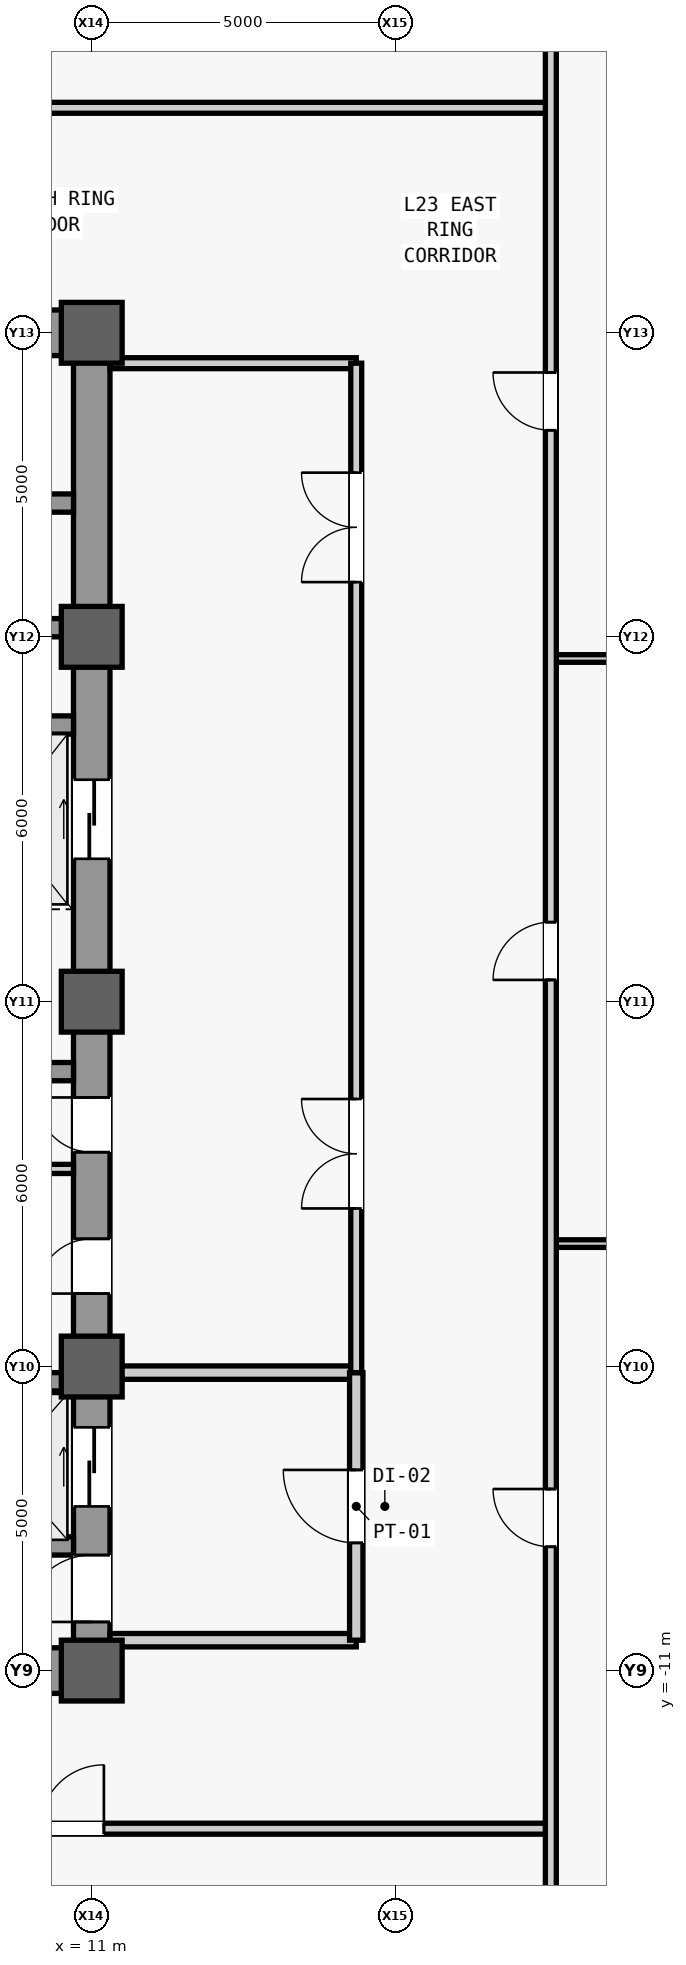
"""IFC4 building model, lengths in metres.
Left out: names, types, materials, properties, quantities, classifications, styles, units other than length and angle.
Written with IfcOpenShell. Run it as: python <this file> out.ifc"""

import sys

from ifc_helpers import new_model, si_unit, direction, frame, frame_2d, origin, origin_2d, place, context, subcontext, project, spatial, rectangle, extrude, source, transform, mapped, element, fill, save


model = new_model("IFC4")
c1 = context("Model", 3, precision=1e-05, world=origin(), true_north=direction((0.0, 1.0)))
c2 = subcontext(c1, "Body", "Model", "MODEL_VIEW")
j1 = project(units=[si_unit("LENGTHUNIT", "METRE"), si_unit("PLANEANGLEUNIT", "RADIAN")], contexts=[c1])
p1 = place(None, origin())
s1 = spatial("IfcSite", under=j1, at=p1, CompositionType="ELEMENT")
p2 = place(p1, origin())
s2 = spatial("IfcBuilding", under=s1, at=p2, CompositionType="ELEMENT")
p3 = place(p2, frame((0.0, 0.0, 103.7)))
s3 = spatial("IfcBuildingStorey", under=s2, at=p3, CompositionType="ELEMENT", Elevation=103.7)
m1 = source(origin(), c2, "Body", "SweptSolid", [
    extrude(rectangle(XDim=22.0, YDim=0.6, at=frame_2d((11.0, 0.0))), origin(), (0.0, 0.0, 1.0), 3.84),
])
p4 = place(p3, frame((11.0, -11.0, 0.0), z_axis=(0.0, 0.0, 1.0), x_axis=(0.0, 1.0, 0.0)))
e1 = element("IfcWall", 1, at=p4, inside=s3, PredefinedType="SHEAR", context=c2, shape_type="MappedRepresentation", body=[
    mapped(m1, transform((0.0, 0.0, 0.0), scale=1.0)),
])
m2 = source(origin(), c2, "Body", "SweptSolid", [
    extrude(rectangle(XDim=1.1, YDim=2.2, at=frame_2d((0.55, 1.1))), frame((0.0, 0.31, 0.0), z_axis=(0.0, -1.0, 0.0), x_axis=(1.0, 0.0, 0.0)), (0.0, 0.0, 1.0), 0.62),
])
p5 = place(p4, frame((0.8, 0.0, 0.0)))
e2 = element("IfcOpeningElement", 2, at=p5, cuts=e1, PredefinedType="OPENING", context=c2, shape_type="MappedRepresentation", body=[
    mapped(m2, transform((0.0, 0.0, 0.0), scale=1.0)),
])
m3 = source(origin(), c2, "Body", "SweptSolid", [
    extrude(rectangle(XDim=0.9, YDim=2.15, at=frame_2d((0.45, 1.075))), frame((0.0, 0.31, 0.0), z_axis=(0.0, -1.0, 0.0), x_axis=(1.0, 0.0, 0.0)), (0.0, 0.0, 1.0), 0.62),
])
p6 = place(p4, frame((6.2, 0.0, 0.0)))
e3 = element("IfcOpeningElement", 3, at=p6, cuts=e1, PredefinedType="OPENING", context=c2, shape_type="MappedRepresentation", body=[
    mapped(m3, transform((0.0, 0.0, 0.0), scale=1.0)),
])
p7 = place(p4, frame((8.525, 0.0, 0.0)))
e4 = element("IfcOpeningElement", 4, at=p7, cuts=e1, PredefinedType="OPENING", context=c2, shape_type="MappedRepresentation", body=[
    mapped(m3, transform((0.0, 0.0, 0.0), scale=1.0)),
])
m4 = source(origin(), c2, "Body", "SweptSolid", [
    extrude(rectangle(XDim=1.3, YDim=2.3, at=frame_2d((0.65, 1.15))), frame((0.0, 0.31, 0.0), z_axis=(0.0, -1.0, 0.0), x_axis=(1.0, 0.0, 0.0)), (0.0, 0.0, 1.0), 0.62),
])
p8 = place(p4, frame((2.7, 0.0, 0.0)))
e5 = element("IfcOpeningElement", 5, at=p8, cuts=e1, PredefinedType="OPENING", context=c2, shape_type="MappedRepresentation", body=[
    mapped(m4, transform((0.0, 0.0, 0.0), scale=1.0)),
])
p9 = place(p4, frame((13.35, 0.0, 0.0)))
e6 = element("IfcOpeningElement", 6, at=p9, cuts=e1, PredefinedType="OPENING", context=c2, shape_type="MappedRepresentation", body=[
    mapped(m4, transform((0.0, 0.0, 0.0), scale=1.0)),
])
m5 = source(origin(), c2, "Body", "SweptSolid", [
    extrude(rectangle(XDim=5.85, YDim=0.75, at=frame_2d((2.925, 0.0))), origin(), (0.0, 0.0, 1.0), 3.84),
])
p10 = place(p3, frame((4.85, -11.0, 0.0), z_axis=(0.0, 0.0, 1.0), x_axis=(1.0, 0.0, 0.0)))
e7 = element("IfcWall", 7, at=p10, inside=s3, PredefinedType="SHEAR", context=c2, shape_type="MappedRepresentation", body=[
    mapped(m5, transform((0.0, 0.0, 0.0), scale=1.0)),
])
p11 = place(p3, frame((4.85, 11.0, 0.0), z_axis=(0.0, 0.0, 1.0), x_axis=(1.0, 0.0, 0.0)))
e8 = element("IfcWall", 8, at=p11, inside=s3, PredefinedType="SHEAR", context=c2, shape_type="MappedRepresentation", body=[
    mapped(m5, transform((0.0, 0.0, 0.0), scale=1.0)),
])
m6 = source(origin(), c2, "Body", "SweptSolid", [
    extrude(rectangle(XDim=1.05, YDim=2.2, at=frame_2d((0.525, 1.1))), frame((0.0, 0.385, 0.0), z_axis=(0.0, -1.0, 0.0), x_axis=(1.0, 0.0, 0.0)), (0.0, 0.0, 1.0), 0.77),
])
p12 = place(p11, frame((1.375, 0.0, 0.0)))
e9 = element("IfcOpeningElement", 9, at=p12, cuts=e8, PredefinedType="OPENING", context=c2, shape_type="MappedRepresentation", body=[
    mapped(m6, transform((0.0, 0.0, 0.0), scale=1.0)),
])
m7 = source(origin(), c2, "Body", "SweptSolid", [
    extrude(rectangle(XDim=5.6, YDim=0.3, at=frame_2d((2.8, 0.0))), origin(), (0.0, 0.0, 1.0), 3.84),
])
p13 = place(p3, frame((5.1, -1.15, 0.0), z_axis=(0.0, 0.0, 1.0), x_axis=(1.0, 0.0, 0.0)))
e10 = element("IfcWall", 10, at=p13, inside=s3, PredefinedType="SHEAR", context=c2, shape_type="MappedRepresentation", body=[
    mapped(m7, transform((0.0, 0.0, 0.0), scale=1.0)),
])
m8 = source(origin(), c2, "Body", "SweptSolid", [
    extrude(rectangle(XDim=1.0, YDim=1.0, at=origin_2d()), origin(), (0.0, 0.0, 1.0), 4.1),
])
for number, where, z_axis, x_axis in (
    (11, (11.0, -11.0, 0.0), (0.0, 0.0, 1.0), (1.0, 0.0, 0.0)),
    (12, (11.0, -6.0, 0.0), (0.0, 0.0, 1.0), (1.0, 0.0, 0.0)),
    (13, (11.0, 0.0, 0.0), (0.0, 0.0, 1.0), (1.0, 0.0, 0.0)),
    (14, (11.0, 6.0, 0.0), (0.0, 0.0, 1.0), (1.0, 0.0, 0.0)),
    (15, (11.0, 11.0, 0.0), (0.0, 0.0, 1.0), (1.0, 0.0, 0.0)),
):
    element("IfcColumn", number, at=place(p3, frame(where, z_axis=z_axis, x_axis=x_axis)), inside=s3, PredefinedType="COLUMN", context=c2, shape_type="MappedRepresentation", body=[
        mapped(m8, transform((0.0, 0.0, 0.0), scale=1.0)),
    ])
m9 = source(origin(), c2, "Body", "SweptSolid", [
    extrude(rectangle(XDim=2.2, YDim=0.3, at=frame_2d((1.1, 0.0))), origin(), (0.0, 0.0, 1.0), 3.84),
])
for number, where, z_axis, x_axis in (
    (16, (8.5, -8.95, 0.0), (0.0, 0.0, 1.0), (1.0, 0.0, 0.0)),
    (17, (8.5, -6.25, 0.0), (0.0, 0.0, 1.0), (1.0, 0.0, 0.0)),
):
    element("IfcWall", number, at=place(p3, frame(where, z_axis=z_axis, x_axis=x_axis)), inside=s3, PredefinedType="SHEAR", context=c2, shape_type="MappedRepresentation", body=[
        mapped(m9, transform((0.0, 0.0, 0.0), scale=1.0)),
    ])
m10 = source(origin(), c2, "Body", "SweptSolid", [
    extrude(rectangle(XDim=2.3, YDim=0.3, at=frame_2d((1.15, 0.0))), origin(), (0.0, 0.0, 1.0), 3.84),
])
for number, where, z_axis, x_axis in (
    (18, (8.4, 4.55, 0.0), (0.0, 0.0, 1.0), (1.0, 0.0, 0.0)),
    (19, (8.4, 6.15, 0.0), (0.0, 0.0, 1.0), (1.0, 0.0, 0.0)),
    (20, (8.4, 8.2, 0.0), (0.0, 0.0, 1.0), (1.0, 0.0, 0.0)),
):
    element("IfcWall", number, at=place(p3, frame(where, z_axis=z_axis, x_axis=x_axis)), inside=s3, PredefinedType="SHEAR", context=c2, shape_type="MappedRepresentation", body=[
        mapped(m10, transform((0.0, 0.0, 0.0), scale=1.0)),
    ])
m11 = source(origin(), c2, "Body", "SweptSolid", [
    extrude(rectangle(XDim=2.05, YDim=0.15, at=frame_2d((1.025, 0.0))), origin(), (0.0, 0.0, 1.0), 3.84),
])
p14 = place(p3, frame((8.65, -2.75, 0.0), z_axis=(0.0, 0.0, 1.0), x_axis=(1.0, 0.0, 0.0)))
e21 = element("IfcWall", 21, at=p14, inside=s3, PredefinedType="PARTITIONING", context=c2, shape_type="MappedRepresentation", body=[
    mapped(m11, transform((0.0, 0.0, 0.0), scale=1.0)),
])
m12 = source(origin(), c2, "Body", "SweptSolid", [
    extrude(rectangle(XDim=4.05, YDim=0.22, at=frame_2d((2.025, 0.0))), origin(), (0.0, 0.0, 1.0), 3.84),
])
p15 = place(p3, frame((11.3, -10.5, 0.0), z_axis=(0.0, 0.0, 1.0), x_axis=(1.0, 0.0, 0.0)))
e22 = element("IfcWall", 22, at=p15, inside=s3, PredefinedType="PARTITIONING", context=c2, shape_type="MappedRepresentation", body=[
    mapped(m12, transform((0.0, 0.0, 0.0), scale=1.0)),
])
m13 = source(origin(), c2, "Body", "SweptSolid", [
    extrude(rectangle(XDim=4.05, YDim=0.22, at=frame_2d((2.025, 0.0))), origin(), (0.0, 0.0, 1.0), 3.067),
])
p16 = place(p3, frame((11.3, -6.1, 0.0), z_axis=(0.0, 0.0, 1.0), x_axis=(1.0, 0.0, 0.0)))
e23 = element("IfcWall", 23, at=p16, inside=s3, PredefinedType="PARTITIONING", context=c2, shape_type="MappedRepresentation", body=[
    mapped(m13, transform((0.0, 0.0, 0.0), scale=1.0)),
])
m14 = source(origin(), c2, "Body", "SweptSolid", [
    extrude(rectangle(XDim=4.4, YDim=0.22, at=frame_2d((2.2, 0.0))), origin(), (0.0, 0.0, 1.0), 3.84),
])
p17 = place(p3, frame((15.35, -10.5, 0.0), z_axis=(0.0, 0.0, 1.0), x_axis=(0.0, 1.0, 0.0)))
e24 = element("IfcWall", 24, at=p17, inside=s3, PredefinedType="PARTITIONING", context=c2, shape_type="MappedRepresentation", body=[
    mapped(m14, transform((0.0, 0.0, 0.0), scale=1.0)),
])
m15 = source(origin(), c2, "Body", "SweptSolid", [
    extrude(rectangle(XDim=1.2, YDim=2.2, at=frame_2d((0.6, 1.1))), frame((0.0, 0.12, 0.0), z_axis=(0.0, -1.0, 0.0), x_axis=(1.0, 0.0, 0.0)), (0.0, 0.0, 1.0), 0.24),
])
p18 = place(p17, frame((1.6, 0.0, 0.0)))
e25 = element("IfcOpeningElement", 25, at=p18, cuts=e24, PredefinedType="OPENING", context=c2, shape_type="MappedRepresentation", body=[
    mapped(m15, transform((0.0, 0.0, 0.0), scale=1.0)),
])
m16 = source(origin(), c2, "Body", "SweptSolid", [
    extrude(rectangle(XDim=4.05, YDim=0.18, at=frame_2d((2.025, 0.0))), origin(), (0.0, 0.0, 1.0), 3.84),
])
p19 = place(p3, frame((11.3, 10.5, 0.0), z_axis=(0.0, 0.0, 1.0), x_axis=(1.0, 0.0, 0.0)))
e26 = element("IfcWall", 26, at=p19, inside=s3, PredefinedType="PARTITIONING", context=c2, shape_type="MappedRepresentation", body=[
    mapped(m16, transform((0.0, 0.0, 0.0), scale=1.0)),
])
m17 = source(origin(), c2, "Body", "SweptSolid", [
    extrude(rectangle(XDim=16.6, YDim=0.18, at=frame_2d((8.3, 0.0))), origin(), (0.0, 0.0, 1.0), 3.84),
])
p20 = place(p3, frame((15.35, -6.1, 0.0), z_axis=(0.0, 0.0, 1.0), x_axis=(0.0, 1.0, 0.0)))
e27 = element("IfcWall", 27, at=p20, inside=s3, PredefinedType="PARTITIONING", context=c2, shape_type="MappedRepresentation", body=[
    mapped(m17, transform((0.0, 0.0, 0.0), scale=1.0)),
])
m18 = source(origin(), c2, "Body", "SweptSolid", [
    extrude(rectangle(XDim=1.8, YDim=2.25, at=frame_2d((0.9, 1.125))), frame((0.0, 0.1, 0.0), z_axis=(0.0, -1.0, 0.0), x_axis=(1.0, 0.0, 0.0)), (0.0, 0.0, 1.0), 0.2),
])
p21 = place(p20, frame((2.7, 0.0, 0.0)))
e28 = element("IfcOpeningElement", 28, at=p21, cuts=e27, PredefinedType="OPENING", context=c2, shape_type="MappedRepresentation", body=[
    mapped(m18, transform((0.0, 0.0, 0.0), scale=1.0)),
])
p22 = place(p20, frame((13.0, 0.0, 0.0)))
e29 = element("IfcOpeningElement", 29, at=p22, cuts=e27, PredefinedType="OPENING", context=c2, shape_type="MappedRepresentation", body=[
    mapped(m18, transform((0.0, 0.0, 0.0), scale=1.0)),
])
m19 = source(origin(), c2, "Body", "SweptSolid", [
    extrude(rectangle(XDim=36.25, YDim=0.18, at=frame_2d((18.125, 0.0))), origin(), (0.0, 0.0, 1.0), 3.84),
])
p23 = place(p3, frame((-17.7, -13.6, 0.0), z_axis=(0.0, 0.0, 1.0), x_axis=(1.0, 0.0, 0.0)))
e30 = element("IfcWall", 30, at=p23, inside=s3, PredefinedType="PARTITIONING", context=c2, shape_type="MappedRepresentation", body=[
    mapped(m19, transform((0.0, 0.0, 0.0), scale=1.0)),
])
m20 = source(origin(), c2, "Body", "SweptSolid", [
    extrude(rectangle(XDim=1.05, YDim=2.2, at=frame_2d((0.525, 1.1))), frame((0.0, 0.1, 0.0), z_axis=(0.0, -1.0, 0.0), x_axis=(1.0, 0.0, 0.0)), (0.0, 0.0, 1.0), 0.2),
])
p24 = place(p23, frame((6.925, 0.0, 0.0)))
e31 = element("IfcOpeningElement", 31, at=p24, cuts=e30, PredefinedType="OPENING", context=c2, shape_type="MappedRepresentation", body=[
    mapped(m20, transform((0.0, 0.0, 0.0), scale=1.0)),
])
p25 = place(p23, frame((17.6, 0.0, 0.0)))
e32 = element("IfcOpeningElement", 32, at=p25, cuts=e30, PredefinedType="OPENING", context=c2, shape_type="MappedRepresentation", body=[
    mapped(m20, transform((0.0, 0.0, 0.0), scale=1.0)),
])
p26 = place(p23, frame((27.85, 0.0, 0.0)))
e33 = element("IfcOpeningElement", 33, at=p26, cuts=e30, PredefinedType="OPENING", context=c2, shape_type="MappedRepresentation", body=[
    mapped(m20, transform((0.0, 0.0, 0.0), scale=1.0)),
])
p27 = place(p3, frame((-17.7, 14.7, 0.0), z_axis=(0.0, 0.0, 1.0), x_axis=(1.0, 0.0, 0.0)))
e34 = element("IfcWall", 34, at=p27, inside=s3, PredefinedType="PARTITIONING", context=c2, shape_type="MappedRepresentation", body=[
    mapped(m19, transform((0.0, 0.0, 0.0), scale=1.0)),
])
p28 = place(p27, frame((17.175, 0.0, 0.0)))
e35 = element("IfcOpeningElement", 35, at=p28, cuts=e34, PredefinedType="OPENING", context=c2, shape_type="MappedRepresentation", body=[
    mapped(m20, transform((0.0, 0.0, 0.0), scale=1.0)),
])
m21 = source(origin(), c2, "Body", "SweptSolid", [
    extrude(rectangle(XDim=13.45, YDim=0.125, at=frame_2d((6.725, 0.0))), origin(), (0.0, 0.0, 1.0), 3.84),
])
for number, where, z_axis, x_axis in (
    (36, (18.55, -3.978, 0.0), (0.0, 0.0, 1.0), (1.0, 0.0, 0.0)),
    (37, (18.55, 5.644, 0.0), (0.0, 0.0, 1.0), (1.0, 0.0, 0.0)),
):
    element("IfcWall", number, at=place(p3, frame(where, z_axis=z_axis, x_axis=x_axis)), inside=s3, PredefinedType="PARTITIONING", context=c2, shape_type="MappedRepresentation", body=[
        mapped(m21, transform((0.0, 0.0, 0.0), scale=1.0)),
    ])
m22 = source(origin(), c2, "Body", "SweptSolid", [
    extrude(rectangle(XDim=56.0, YDim=0.18, at=frame_2d((28.0, 0.0))), origin(), (0.0, 0.0, 1.0), 3.84),
])
p29 = place(p3, frame((18.55, -28.0, 0.0), z_axis=(0.0, 0.0, 1.0), x_axis=(0.0, 1.0, 0.0)))
e38 = element("IfcWall", 38, at=p29, inside=s3, PredefinedType="PARTITIONING", context=c2, shape_type="MappedRepresentation", body=[
    mapped(m22, transform((0.0, 0.0, 0.0), scale=1.0)),
])
m23 = source(origin(), c2, "Body", "SweptSolid", [
    extrude(rectangle(XDim=0.95, YDim=2.15, at=frame_2d((0.475, 1.075))), frame((0.0, 0.1, 0.0), z_axis=(0.0, -1.0, 0.0), x_axis=(1.0, 0.0, 0.0)), (0.0, 0.0, 1.0), 0.2),
])
p30 = place(p29, frame((19.036, 0.0, 0.0)))
e39 = element("IfcOpeningElement", 39, at=p30, cuts=e38, PredefinedType="OPENING", context=c2, shape_type="MappedRepresentation", body=[
    mapped(m23, transform((0.0, 0.0, 0.0), scale=1.0)),
])
p31 = place(p29, frame((28.358, 0.0, 0.0)))
e40 = element("IfcOpeningElement", 40, at=p31, cuts=e38, PredefinedType="OPENING", context=c2, shape_type="MappedRepresentation", body=[
    mapped(m23, transform((0.0, 0.0, 0.0), scale=1.0)),
])
p32 = place(p29, frame((37.397, 0.0, 0.0)))
e41 = element("IfcOpeningElement", 41, at=p32, cuts=e38, PredefinedType="OPENING", context=c2, shape_type="MappedRepresentation", body=[
    mapped(m23, transform((0.0, 0.0, 0.0), scale=1.0)),
])
m24 = source(origin(), c2, "Body", "SweptSolid", [
    extrude(rectangle(XDim=1.1, YDim=2.2, at=frame_2d((0.55, 1.1))), frame((0.0, 0.025, 0.0), z_axis=(0.0, -1.0, 0.0), x_axis=(1.0, 0.0, 0.0)), (0.0, 0.0, 1.0), 0.05),
])
p33 = place(p5, origin())
e42 = element("IfcDoor", 42, at=p33, inside=s3, OperationType="SINGLE_SWING_LEFT", PredefinedType="DOOR", context=c2, shape_type="MappedRepresentation", body=[
    mapped(m24, transform((0.0, 0.0, 0.0), scale=1.0)),
])
fill(e2, e42)
m25 = source(origin(), c2, "Body", "SweptSolid", [
    extrude(rectangle(XDim=0.9, YDim=2.15, at=frame_2d((0.45, 1.075))), frame((0.0, 0.025, 0.0), z_axis=(0.0, -1.0, 0.0), x_axis=(1.0, 0.0, 0.0)), (0.0, 0.0, 1.0), 0.05),
])
p34 = place(p6, origin())
e43 = element("IfcDoor", 43, at=p34, inside=s3, OperationType="SINGLE_SWING_LEFT", PredefinedType="DOOR", context=c2, shape_type="MappedRepresentation", body=[
    mapped(m25, transform((0.0, 0.0, 0.0), scale=1.0)),
])
fill(e3, e43)
p35 = place(p7, origin())
e44 = element("IfcDoor", 44, at=p35, inside=s3, OperationType="SINGLE_SWING_RIGHT", PredefinedType="DOOR", context=c2, shape_type="MappedRepresentation", body=[
    mapped(m25, transform((0.0, 0.0, 0.0), scale=1.0)),
])
fill(e4, e44)
m26 = source(origin(), c2, "Body", "SweptSolid", [
    extrude(rectangle(XDim=1.2, YDim=2.2, at=frame_2d((0.6, 1.1))), frame((0.0, 0.025, 0.0), z_axis=(0.0, -1.0, 0.0), x_axis=(1.0, 0.0, 0.0)), (0.0, 0.0, 1.0), 0.05),
])
p36 = place(p18, origin())
e45 = element("IfcDoor", 45, at=p36, inside=s3, OperationType="SINGLE_SWING_RIGHT", PredefinedType="DOOR", context=c2, shape_type="MappedRepresentation", body=[
    mapped(m26, transform((0.0, 0.0, 0.0), scale=1.0)),
])
fill(e25, e45)
m27 = source(origin(), c2, "Body", "SweptSolid", [
    extrude(rectangle(XDim=1.8, YDim=2.25, at=frame_2d((0.9, 1.125))), frame((0.0, 0.025, 0.0), z_axis=(0.0, -1.0, 0.0), x_axis=(1.0, 0.0, 0.0)), (0.0, 0.0, 1.0), 0.05),
])
p37 = place(p21, origin())
e46 = element("IfcDoor", 46, at=p37, inside=s3, OperationType="SINGLE_SWING_RIGHT", PredefinedType="DOOR", context=c2, shape_type="MappedRepresentation", body=[
    mapped(m27, transform((0.0, 0.0, 0.0), scale=1.0)),
])
fill(e28, e46)
p38 = place(p22, origin())
e47 = element("IfcDoor", 47, at=p38, inside=s3, OperationType="SINGLE_SWING_LEFT", PredefinedType="DOOR", context=c2, shape_type="MappedRepresentation", body=[
    mapped(m27, transform((0.0, 0.0, 0.0), scale=1.0)),
])
fill(e29, e47)
m28 = source(origin(), c2, "Body", "SweptSolid", [
    extrude(rectangle(XDim=1.05, YDim=2.2, at=frame_2d((0.525, 1.1))), frame((0.0, 0.025, 0.0), z_axis=(0.0, -1.0, 0.0), x_axis=(1.0, 0.0, 0.0)), (0.0, 0.0, 1.0), 0.05),
])
p39 = place(p26, origin())
e48 = element("IfcDoor", 48, at=p39, inside=s3, OperationType="SINGLE_SWING_RIGHT", PredefinedType="DOOR", context=c2, shape_type="MappedRepresentation", body=[
    mapped(m28, transform((0.0, 0.0, 0.0), scale=1.0)),
])
fill(e33, e48)
m29 = source(origin(), c2, "Body", "SweptSolid", [
    extrude(rectangle(XDim=0.95, YDim=2.15, at=frame_2d((0.475, 1.075))), frame((0.0, 0.025, 0.0), z_axis=(0.0, -1.0, 0.0), x_axis=(1.0, 0.0, 0.0)), (0.0, 0.0, 1.0), 0.05),
])
p40 = place(p30, origin())
e49 = element("IfcDoor", 49, at=p40, inside=s3, OperationType="SINGLE_SWING_RIGHT", PredefinedType="DOOR", context=c2, shape_type="MappedRepresentation", body=[
    mapped(m29, transform((0.0, 0.0, 0.0), scale=1.0)),
])
fill(e39, e49)
p41 = place(p31, origin())
e50 = element("IfcDoor", 50, at=p41, inside=s3, OperationType="SINGLE_SWING_LEFT", PredefinedType="DOOR", context=c2, shape_type="MappedRepresentation", body=[
    mapped(m29, transform((0.0, 0.0, 0.0), scale=1.0)),
])
fill(e40, e50)
p42 = place(p32, origin())
e51 = element("IfcDoor", 51, at=p42, inside=s3, OperationType="SINGLE_SWING_RIGHT", PredefinedType="DOOR", context=c2, shape_type="MappedRepresentation", body=[
    mapped(m29, transform((0.0, 0.0, 0.0), scale=1.0)),
])
fill(e41, e51)
m30 = source(origin(), c2, "Body", "SweptSolid", [
    extrude(rectangle(XDim=1.3, YDim=2.3, at=frame_2d((0.65, 1.15))), frame((0.0, 0.025, 0.0), z_axis=(0.0, -1.0, 0.0), x_axis=(1.0, 0.0, 0.0)), (0.0, 0.0, 1.0), 0.05),
])
p43 = place(p8, origin())
e52 = element("IfcDoor", 52, at=p43, inside=s3, OperationType="SLIDING_TO_LEFT", PredefinedType="DOOR", context=c2, shape_type="MappedRepresentation", body=[
    mapped(m30, transform((0.0, 0.0, 0.0), scale=1.0)),
])
fill(e5, e52)
p44 = place(p9, origin())
e53 = element("IfcDoor", 53, at=p44, inside=s3, OperationType="SLIDING_TO_LEFT", PredefinedType="DOOR", context=c2, shape_type="MappedRepresentation", body=[
    mapped(m30, transform((0.0, 0.0, 0.0), scale=1.0)),
])
fill(e6, e53)
save(model, sys.argv[1])
